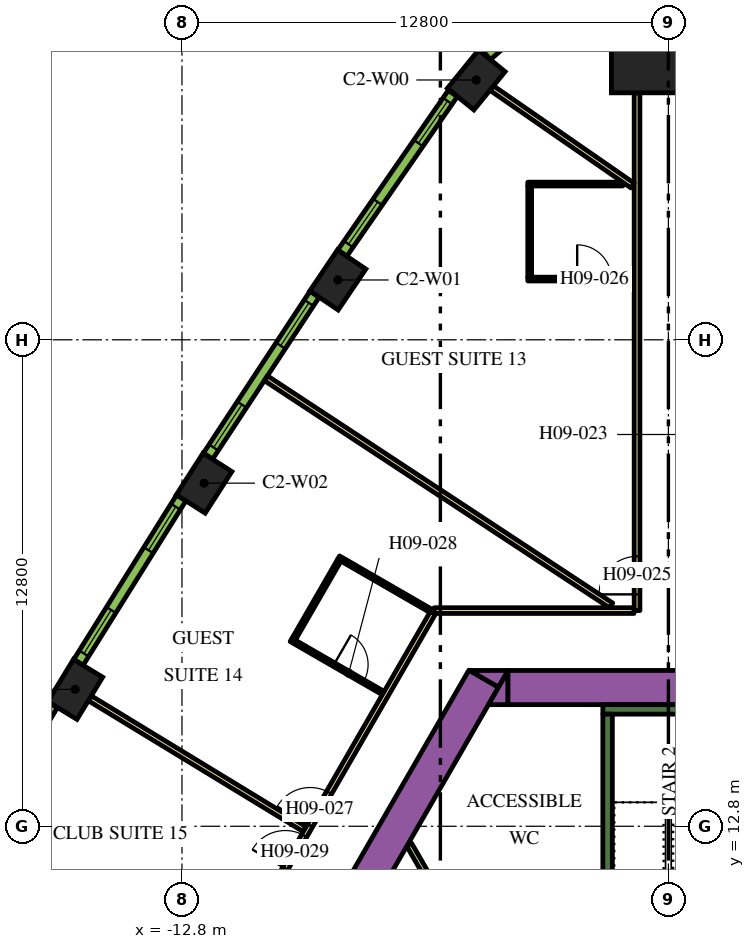
"""IFC4 building model, lengths in metres.
Left out: names, types, materials, properties, quantities, classifications, styles, units other than length and angle.
Written with IfcOpenShell. Run it as: python <this file> out.ifc"""

import sys

from ifc_helpers import new_model, si_unit, direction, frame, frame_2d, origin, origin_2d, place, context, subcontext, project, spatial, polyline, rectangle, outline, extrude, element, fill, save


model = new_model("IFC4")
c1 = context("Model", 3, precision=1e-05, world=origin(), true_north=direction((0.0, 1.0)))
c2 = subcontext(c1, "Body", "Model", "MODEL_VIEW")
j1 = project(units=[si_unit("LENGTHUNIT", "METRE"), si_unit("PLANEANGLEUNIT", "RADIAN")], contexts=[c1])
p1 = place(None, origin())
s1 = spatial("IfcSite", under=j1, at=p1, CompositionType="ELEMENT")
p2 = place(p1, origin())
s2 = spatial("IfcBuilding", under=s1, at=p2, CompositionType="ELEMENT")
p3 = place(p2, frame((0.0, 0.0, 122.7)))
s3 = spatial("IfcBuildingStorey", under=s2, at=p3, CompositionType="ELEMENT", Elevation=122.7)
p4 = place(p3, frame((0.0, 33.598, 0.0), z_axis=(0.0, 0.0, 1.0), x_axis=(0.0, 1.0, 0.0)))
e1 = element("IfcColumn", 1, at=p4, inside=s3, PredefinedType="COLUMN", context=c2, shape_type="SweptSolid", body=[
    extrude(rectangle(XDim=3.0, YDim=3.0, at=origin_2d()), origin(), (0.0, 0.0, 1.0), 3.9),
])
for number, where, z_axis, x_axis in (
    (2, (-5.056, 32.437, 0.0), (0.0, 0.0, 1.0), (-0.632, -0.775, 0.0)),
    (3, (-8.699, 27.174, 0.0), (0.0, 0.0, 1.0), (-0.559, -0.829, 0.0)),
    (4, (-12.217, 21.828, 0.0), (0.0, 0.0, 1.0), (-0.54, -0.842, 0.0)),
    (5, (-15.609, 16.402, 0.0), (0.0, 0.0, 1.0), (-0.52, -0.854, 0.0)),
):
    element("IfcColumn", number, at=place(p3, frame(where, z_axis=z_axis, x_axis=x_axis)), inside=s3, PredefinedType="COLUMN", context=c2, shape_type="SweptSolid", body=[
        extrude(rectangle(XDim=1.3, YDim=0.9, at=origin_2d()), origin(), (0.0, 0.0, 1.0), 3.9),
    ])
p5 = place(p3, frame((-15.36, -1.503, 0.0), z_axis=(0.0, 0.0, 1.0), x_axis=(0.50000389221, 0.866023156604, 0.0)))
e6 = element("IfcWall", 6, at=p5, inside=s3, PredefinedType="SOLIDWALL", context=c2, shape_type="SweptSolid", body=[
    extrude(rectangle(XDim=21.0, YDim=0.9, at=frame_2d((10.5, 0.0))), origin(), (0.0, 0.0, 1.0), 3.9),
])
p6 = place(p3, origin())
e7 = element("IfcWall", 7, at=p6, inside=s3, PredefinedType="SOLIDWALL", context=c2, shape_type="SweptSolid", body=[
    extrude(outline(polyline([(-4.215, 16.9), (-4.469, 16.46), (-5.231, 16.9), (-4.215, 16.9)])), origin(), (0.0, 0.0, 1.0), 3.9),
])
p7 = place(p3, frame((-4.224, 16.45, 0.0), z_axis=(0.0, 0.0, 1.0), x_axis=(1.0, 0.0, 0.0)))
e8 = element("IfcWall", 8, at=p7, inside=s3, PredefinedType="SOLIDWALL", context=c2, shape_type="SweptSolid", body=[
    extrude(rectangle(XDim=9.488, YDim=0.9, at=frame_2d((4.744, 0.0))), origin(), (0.0, 0.0, 1.0), 3.9),
])
e9 = element("IfcWall", 9, at=p6, inside=s3, PredefinedType="SOLIDWALL", context=c2, shape_type="SweptSolid", body=[
    extrude(outline(polyline([(-4.734, 16.0), (-4.226, 16.88), (-4.226, 16.0), (-4.734, 16.0)])), origin(), (0.0, 0.0, 1.0), 3.9),
])
p8 = place(p3, frame((-1.725, 15.875, 0.0), z_axis=(0.0, 0.0, 1.0), x_axis=(1.0, 0.0, 0.0)))
e10 = element("IfcWall", 10, at=p8, inside=s3, PredefinedType="SOLIDWALL", context=c2, shape_type="SweptSolid", body=[
    extrude(rectangle(XDim=3.45, YDim=0.25, at=frame_2d((1.725, 0.0))), origin(), (0.0, 0.0, 1.0), 3.9),
])
p9 = place(p3, frame((-1.6, 8.7, 0.0), z_axis=(0.0, 0.0, 1.0), x_axis=(0.0, 1.0, 0.0)))
e11 = element("IfcWall", 11, at=p9, inside=s3, PredefinedType="SOLIDWALL", context=c2, shape_type="SweptSolid", body=[
    extrude(rectangle(XDim=7.05, YDim=0.25, at=frame_2d((3.525, 0.0))), origin(), (0.0, 0.0, 1.0), 3.9),
])
p10 = place(p3, frame((-6.823, 12.318, 0.0), z_axis=(0.0, 0.0, 1.0), x_axis=(0.500007885066, -0.866020851292, 0.0)))
e12 = element("IfcWall", 12, at=p10, inside=s3, PredefinedType="PARTITIONING", context=c2, shape_type="SweptSolid", body=[
    extrude(rectangle(XDim=4.072, YDim=0.15, at=frame_2d((2.036, 0.0))), origin(), (0.0, 0.0, 1.0), 2.75),
])
p11 = place(p3, frame((-0.825, 18.475, 0.0), z_axis=(0.0, 0.0, 1.0), x_axis=(0.0, 1.0, 0.0)))
e13 = element("IfcWall", 13, at=p11, inside=s3, PredefinedType="PARTITIONING", context=c2, shape_type="SweptSolid", body=[
    extrude(rectangle(XDim=13.623, YDim=0.15, at=frame_2d((6.812, 0.0))), origin(), (0.0, 0.0, 1.0), 2.75),
])
p12 = place(p11, frame((0.427, 0.0, 0.0)))
e14 = element("IfcOpeningElement", 14, at=p12, cuts=e13, PredefinedType="OPENING", context=c2, shape_type="SweptSolid", body=[
    extrude(rectangle(XDim=1.0, YDim=2.1, at=frame_2d((0.5, 1.05))), frame((0.0, 0.085, 0.0), z_axis=(0.0, -1.0, 0.0), x_axis=(1.0, 0.0, 0.0)), (0.0, 0.0, 1.0), 0.17),
])
p13 = place(p3, frame((-6.163, 18.475, 0.0), z_axis=(0.0, 0.0, 1.0), x_axis=(1.0, 0.0, 0.0)))
e15 = element("IfcWall", 15, at=p13, inside=s3, PredefinedType="PARTITIONING", context=c2, shape_type="SweptSolid", body=[
    extrude(rectangle(XDim=5.258, YDim=0.15, at=frame_2d((2.629, 0.0))), origin(), (0.0, 0.0, 1.0), 2.75),
])
p14 = place(p3, frame((-19.081, -3.9, 0.0), z_axis=(0.0, 0.0, 1.0), x_axis=(0.499998313975, 0.866026377209, 0.0)))
e16 = element("IfcWall", 16, at=p14, inside=s3, PredefinedType="PARTITIONING", context=c2, shape_type="SweptSolid", body=[
    extrude(rectangle(XDim=25.766, YDim=0.15, at=frame_2d((12.883, 0.0))), origin(), (0.0, 0.0, 1.0), 2.75),
])
p15 = place(p14, frame((19.306, 0.0, 0.0)))
e17 = element("IfcOpeningElement", 17, at=p15, cuts=e16, PredefinedType="OPENING", context=c2, shape_type="SweptSolid", body=[
    extrude(rectangle(XDim=1.0, YDim=2.1, at=frame_2d((0.5, 1.05))), frame((0.0, 0.085, 0.0), z_axis=(0.0, -1.0, 0.0), x_axis=(1.0, 0.0, 0.0)), (0.0, 0.0, 1.0), 0.17),
])
p16 = place(p14, frame((18.0, 0.0, 0.0)))
e18 = element("IfcOpeningElement", 18, at=p16, cuts=e16, PredefinedType="OPENING", context=c2, shape_type="SweptSolid", body=[
    extrude(rectangle(XDim=1.0, YDim=2.1, at=frame_2d((0.5, 1.05))), frame((0.0, 0.085, 0.0), z_axis=(0.0, -1.0, 0.0), x_axis=(1.0, 0.0, 0.0)), (0.0, 0.0, 1.0), 0.17),
])
p17 = place(p14, frame((7.793, 0.0, 0.0)))
e19 = element("IfcOpeningElement", 19, at=p17, cuts=e16, PredefinedType="OPENING", context=c2, shape_type="SweptSolid", body=[
    extrude(rectangle(XDim=0.9, YDim=2.1, at=frame_2d((0.45, 1.05))), frame((0.0, 0.085, 0.0), z_axis=(0.0, -1.0, 0.0), x_axis=(1.0, 0.0, 0.0)), (0.0, 0.0, 1.0), 0.17),
])
p18 = place(p14, frame((4.674, 0.0, 0.0)))
e20 = element("IfcOpeningElement", 20, at=p18, cuts=e16, PredefinedType="OPENING", context=c2, shape_type="SweptSolid", body=[
    extrude(rectangle(XDim=0.9, YDim=2.1, at=frame_2d((0.45, 1.05))), frame((0.0, 0.085, 0.0), z_axis=(0.0, -1.0, 0.0), x_axis=(1.0, 0.0, 0.0)), (0.0, 0.0, 1.0), 0.17),
])
p19 = place(p14, frame((0.18, 0.0, 0.0)))
e21 = element("IfcOpeningElement", 21, at=p19, cuts=e16, PredefinedType="OPENING", context=c2, shape_type="SweptSolid", body=[
    extrude(rectangle(XDim=1.0, YDim=2.1, at=frame_2d((0.5, 1.05))), frame((0.0, 0.085, 0.0), z_axis=(0.0, -1.0, 0.0), x_axis=(1.0, 0.0, 0.0)), (0.0, 0.0, 1.0), 0.17),
])
p20 = place(p3, frame((-15.225, 16.167, 0.0), z_axis=(0.0, 0.0, 1.0), x_axis=(0.854088713274, -0.520127359266, 0.0)))
e22 = element("IfcWall", 22, at=p20, inside=s3, PredefinedType="PARTITIONING", context=c2, shape_type="SweptSolid", body=[
    extrude(rectangle(XDim=6.611, YDim=0.15, at=frame_2d((3.305, 0.0))), origin(), (0.0, 0.0, 1.0), 2.75),
])
p21 = place(p3, frame((-10.592, 24.589, 0.0), z_axis=(0.0, 0.0, 1.0), x_axis=(0.835337323748, -0.549737715236, 0.0)))
e23 = element("IfcWall", 23, at=p21, inside=s3, PredefinedType="PARTITIONING", context=c2, shape_type="SweptSolid", body=[
    extrude(rectangle(XDim=10.875, YDim=0.15, at=frame_2d((5.438, 0.0))), origin(), (0.0, 0.0, 1.0), 2.75),
])
p22 = place(p3, frame((-4.649, 32.223, 0.0), z_axis=(0.0, 0.0, 1.0), x_axis=(0.822262349475, -0.569108626394, 0.0)))
e24 = element("IfcWall", 24, at=p22, inside=s3, PredefinedType="PARTITIONING", context=c2, shape_type="SweptSolid", body=[
    extrude(rectangle(XDim=4.51, YDim=0.15, at=frame_2d((2.255, 0.0))), origin(), (0.0, 0.0, 1.0), 2.75),
])
p23 = place(p3, frame((-3.7, 27.198, 0.0), z_axis=(0.0, 0.0, 1.0), x_axis=(1.0, 0.0, 0.0)))
e25 = element("IfcWall", 25, at=p23, inside=s3, PredefinedType="PARTITIONING", context=c2, shape_type="SweptSolid", body=[
    extrude(rectangle(XDim=2.8, YDim=0.1, at=frame_2d((1.4, 0.0))), origin(), (0.0, 0.0, 1.0), 2.75),
])
p24 = place(p23, frame((1.3, 0.0, 0.0)))
e26 = element("IfcOpeningElement", 26, at=p24, cuts=e25, PredefinedType="OPENING", context=c2, shape_type="SweptSolid", body=[
    extrude(rectangle(XDim=0.9, YDim=2.1, at=frame_2d((0.45, 1.05))), frame((0.0, 0.06, 0.0), z_axis=(0.0, -1.0, 0.0), x_axis=(1.0, 0.0, 0.0)), (0.0, 0.0, 1.0), 0.12),
])
p25 = place(p3, frame((-3.65, 27.248, 0.0), z_axis=(0.0, 0.0, 1.0), x_axis=(0.0, 1.0, 0.0)))
e27 = element("IfcWall", 27, at=p25, inside=s3, PredefinedType="PARTITIONING", context=c2, shape_type="SweptSolid", body=[
    extrude(rectangle(XDim=2.4, YDim=0.1, at=frame_2d((1.2, 0.0))), origin(), (0.0, 0.0, 1.0), 2.75),
])
p26 = place(p3, frame((-1.2, 29.698, 0.0), z_axis=(0.0, 0.0, 1.0), x_axis=(-1.0, 0.0, 0.0)))
e28 = element("IfcWall", 28, at=p26, inside=s3, PredefinedType="PARTITIONING", context=c2, shape_type="SweptSolid", body=[
    extrude(rectangle(XDim=2.5, YDim=0.1, at=frame_2d((1.25, 0.0))), origin(), (0.0, 0.0, 1.0), 2.75),
])
p27 = place(p3, frame((-9.928, 17.704, 0.0), z_axis=(0.0, 0.0, 1.0), x_axis=(0.866034573852, -0.49998411664, 0.0)))
e29 = element("IfcWall", 29, at=p27, inside=s3, PredefinedType="PARTITIONING", context=c2, shape_type="SweptSolid", body=[
    extrude(rectangle(XDim=2.8, YDim=0.1, at=frame_2d((1.4, 0.0))), origin(), (0.0, 0.0, 1.0), 2.75),
])
p28 = place(p27, frame((1.3, 0.0, 0.0)))
e30 = element("IfcOpeningElement", 30, at=p28, cuts=e29, PredefinedType="OPENING", context=c2, shape_type="SweptSolid", body=[
    extrude(rectangle(XDim=0.9, YDim=2.1, at=frame_2d((0.45, 1.05))), frame((0.0, 0.06, 0.0), z_axis=(0.0, -1.0, 0.0), x_axis=(1.0, 0.0, 0.0)), (0.0, 0.0, 1.0), 0.12),
])
p29 = place(p3, frame((-9.86, 17.722, 0.0), z_axis=(0.0, 0.0, 1.0), x_axis=(0.500001309137, 0.866024647952, 0.0)))
e31 = element("IfcWall", 31, at=p29, inside=s3, PredefinedType="PARTITIONING", context=c2, shape_type="SweptSolid", body=[
    extrude(rectangle(XDim=2.4, YDim=0.1, at=frame_2d((1.2, 0.0))), origin(), (0.0, 0.0, 1.0), 2.75),
])
p30 = place(p3, frame((-6.253, 18.469, 0.0), z_axis=(0.0, 0.0, 1.0), x_axis=(-0.866034573852, 0.49998411664, 0.0)))
e32 = element("IfcWall", 32, at=p30, inside=s3, PredefinedType="PARTITIONING", context=c2, shape_type="SweptSolid", body=[
    extrude(rectangle(XDim=2.8, YDim=0.1, at=frame_2d((1.4, 0.0))), origin(), (0.0, 0.0, 1.0), 2.75),
])
p31 = place(p3, frame((-3.405, 34.275, 0.0), z_axis=(0.0, 0.0, 1.0), x_axis=(-0.754882764627, -0.655859749999, 0.0)))
e33 = element("IfcWall", 33, at=p31, inside=s3, PredefinedType="SOLIDWALL", context=c2, shape_type="SweptSolid", body=[
    extrude(rectangle(XDim=1.82, YDim=0.29, at=frame_2d((0.91, 0.0))), origin(), (0.0, 0.0, 1.0), 3.65),
])
p32 = place(p31, frame((0.46, 0.0, 0.9)))
e34 = element("IfcOpeningElement", 34, at=p32, cuts=e33, PredefinedType="OPENING", context=c2, shape_type="SweptSolid", body=[
    extrude(rectangle(XDim=0.9, YDim=2.15, at=frame_2d((0.45, 1.075))), frame((0.0, 0.155, 0.0), z_axis=(0.0, -1.0, 0.0), x_axis=(1.0, 0.0, 0.0)), (0.0, 0.0, 1.0), 0.31),
])
p33 = place(p3, frame((-5.673, 32.081, 0.0), z_axis=(0.0, 0.0, 1.0), x_axis=(-0.569113019126, -0.822259309136, 0.0)))
e35 = element("IfcWall", 35, at=p33, inside=s3, PredefinedType="SOLIDWALL", context=c2, shape_type="SweptSolid", body=[
    extrude(rectangle(XDim=5.107, YDim=0.29, at=frame_2d((2.553, 0.0))), origin(), (0.0, 0.0, 1.0), 3.65),
])
p34 = place(p33, frame((0.24, 0.0, 0.9)))
e36 = element("IfcOpeningElement", 36, at=p34, cuts=e35, PredefinedType="OPENING", context=c2, shape_type="SweptSolid", body=[
    extrude(rectangle(XDim=1.35, YDim=2.15, at=frame_2d((0.675, 1.075))), frame((0.0, 0.155, 0.0), z_axis=(0.0, -1.0, 0.0), x_axis=(1.0, 0.0, 0.0)), (0.0, 0.0, 1.0), 0.31),
])
p35 = place(p33, frame((3.471, 0.0, 0.9)))
e37 = element("IfcOpeningElement", 37, at=p35, cuts=e35, PredefinedType="OPENING", context=c2, shape_type="SweptSolid", body=[
    extrude(rectangle(XDim=1.35, YDim=2.15, at=frame_2d((0.675, 1.075))), frame((0.0, 0.155, 0.0), z_axis=(0.0, -1.0, 0.0), x_axis=(1.0, 0.0, 0.0)), (0.0, 0.0, 1.0), 0.31),
])
p36 = place(p3, frame((-9.311, 26.799, 0.0), z_axis=(0.0, 0.0, 1.0), x_axis=(-0.549741341923, -0.835334937005, 0.0)))
e38 = element("IfcWall", 38, at=p36, inside=s3, PredefinedType="SOLIDWALL", context=c2, shape_type="SweptSolid", body=[
    extrude(rectangle(XDim=5.1, YDim=0.29, at=frame_2d((2.55, 0.0))), origin(), (0.0, 0.0, 1.0), 3.65),
])
p37 = place(p36, frame((0.273, 0.0, 0.9)))
e39 = element("IfcOpeningElement", 39, at=p37, cuts=e38, PredefinedType="OPENING", context=c2, shape_type="SweptSolid", body=[
    extrude(rectangle(XDim=1.35, YDim=2.15, at=frame_2d((0.675, 1.075))), frame((0.0, 0.155, 0.0), z_axis=(0.0, -1.0, 0.0), x_axis=(1.0, 0.0, 0.0)), (0.0, 0.0, 1.0), 0.31),
])
p38 = place(p36, frame((3.478, 0.0, 0.9)))
e40 = element("IfcOpeningElement", 40, at=p38, cuts=e38, PredefinedType="OPENING", context=c2, shape_type="SweptSolid", body=[
    extrude(rectangle(XDim=1.35, YDim=2.15, at=frame_2d((0.675, 1.075))), frame((0.0, 0.155, 0.0), z_axis=(0.0, -1.0, 0.0), x_axis=(1.0, 0.0, 0.0)), (0.0, 0.0, 1.0), 0.31),
])
p39 = place(p3, frame((-12.82, 21.439, 0.0), z_axis=(0.0, 0.0, 1.0), x_axis=(-0.530072082134, -0.847952585787, 0.0)))
e41 = element("IfcWall", 41, at=p39, inside=s3, PredefinedType="SOLIDWALL", context=c2, shape_type="SweptSolid", body=[
    extrude(rectangle(XDim=5.1, YDim=0.29, at=frame_2d((2.55, 0.0))), origin(), (0.0, 0.0, 1.0), 3.65),
])
p40 = place(p39, frame((0.273, 0.0, 0.9)))
e42 = element("IfcOpeningElement", 42, at=p40, cuts=e41, PredefinedType="OPENING", context=c2, shape_type="SweptSolid", body=[
    extrude(rectangle(XDim=1.35, YDim=2.15, at=frame_2d((0.675, 1.075))), frame((0.0, 0.155, 0.0), z_axis=(0.0, -1.0, 0.0), x_axis=(1.0, 0.0, 0.0)), (0.0, 0.0, 1.0), 0.31),
])
p41 = place(p39, frame((3.478, 0.0, 0.9)))
e43 = element("IfcOpeningElement", 43, at=p41, cuts=e41, PredefinedType="OPENING", context=c2, shape_type="SweptSolid", body=[
    extrude(rectangle(XDim=1.35, YDim=2.15, at=frame_2d((0.675, 1.075))), frame((0.0, 0.155, 0.0), z_axis=(0.0, -1.0, 0.0), x_axis=(1.0, 0.0, 0.0)), (0.0, 0.0, 1.0), 0.31),
])
p42 = place(p3, frame((-16.203, 15.998, 0.0), z_axis=(0.0, 0.0, 1.0), x_axis=(-0.510054281659, -0.860142214847, 0.0)))
e44 = element("IfcWall", 44, at=p42, inside=s3, PredefinedType="SOLIDWALL", context=c2, shape_type="SweptSolid", body=[
    extrude(rectangle(XDim=5.101, YDim=0.29, at=frame_2d((2.55, 0.0))), origin(), (0.0, 0.0, 1.0), 3.65),
])
p43 = place(p42, frame((0.273, 0.0, 0.9)))
e45 = element("IfcOpeningElement", 45, at=p43, cuts=e44, PredefinedType="OPENING", context=c2, shape_type="SweptSolid", body=[
    extrude(rectangle(XDim=1.35, YDim=2.15, at=frame_2d((0.675, 1.075))), frame((0.0, 0.155, 0.0), z_axis=(0.0, -1.0, 0.0), x_axis=(1.0, 0.0, 0.0)), (0.0, 0.0, 1.0), 0.31),
])
p44 = place(p42, frame((3.478, 0.0, 0.9)))
e46 = element("IfcOpeningElement", 46, at=p44, cuts=e44, PredefinedType="OPENING", context=c2, shape_type="SweptSolid", body=[
    extrude(rectangle(XDim=1.35, YDim=2.15, at=frame_2d((0.675, 1.075))), frame((0.0, 0.155, 0.0), z_axis=(0.0, -1.0, 0.0), x_axis=(1.0, 0.0, 0.0)), (0.0, 0.0, 1.0), 0.31),
])
p45 = place(p12, origin())
e47 = element("IfcDoor", 47, at=p45, inside=s3, OperationType="SINGLE_SWING_LEFT", PredefinedType="DOOR", context=c2, shape_type="SweptSolid", body=[
    extrude(rectangle(XDim=1.0, YDim=2.1, at=frame_2d((0.5, 1.05))), frame((0.0, 0.025, 0.0), z_axis=(0.0, -1.0, 0.0), x_axis=(1.0, 0.0, 0.0)), (0.0, 0.0, 1.0), 0.05),
])
fill(e14, e47)
p46 = place(p24, origin())
e48 = element("IfcDoor", 48, at=p46, inside=s3, OperationType="SINGLE_SWING_LEFT", PredefinedType="DOOR", context=c2, shape_type="SweptSolid", body=[
    extrude(rectangle(XDim=0.9, YDim=2.1, at=frame_2d((0.45, 1.05))), frame((0.0, 0.025, 0.0), z_axis=(0.0, -1.0, 0.0), x_axis=(1.0, 0.0, 0.0)), (0.0, 0.0, 1.0), 0.05),
])
fill(e26, e48)
p47 = place(p15, origin())
e49 = element("IfcDoor", 49, at=p47, inside=s3, OperationType="SINGLE_SWING_LEFT", PredefinedType="DOOR", context=c2, shape_type="SweptSolid", body=[
    extrude(rectangle(XDim=1.0, YDim=2.1, at=frame_2d((0.5, 1.05))), frame((0.0, 0.025, 0.0), z_axis=(0.0, -1.0, 0.0), x_axis=(1.0, 0.0, 0.0)), (0.0, 0.0, 1.0), 0.05),
])
fill(e17, e49)
p48 = place(p28, origin())
e50 = element("IfcDoor", 50, at=p48, inside=s3, OperationType="SINGLE_SWING_LEFT", PredefinedType="DOOR", context=c2, shape_type="SweptSolid", body=[
    extrude(rectangle(XDim=0.9, YDim=2.1, at=frame_2d((0.45, 1.05))), frame((0.0, 0.025, 0.0), z_axis=(0.0, -1.0, 0.0), x_axis=(1.0, 0.0, 0.0)), (0.0, 0.0, 1.0), 0.05),
])
fill(e30, e50)
p49 = place(p16, origin())
e51 = element("IfcDoor", 51, at=p49, inside=s3, OperationType="SINGLE_SWING_RIGHT", PredefinedType="DOOR", context=c2, shape_type="SweptSolid", body=[
    extrude(rectangle(XDim=1.0, YDim=2.1, at=frame_2d((0.5, 1.05))), frame((0.0, 0.025, 0.0), z_axis=(0.0, -1.0, 0.0), x_axis=(1.0, 0.0, 0.0)), (0.0, 0.0, 1.0), 0.05),
])
fill(e18, e51)
p50 = place(p34, origin())
e52 = element("IfcWindow", 52, at=p50, inside=s3, PartitioningType="DOUBLE_PANEL_VERTICAL", PredefinedType="WINDOW", context=c2, shape_type="SweptSolid", body=[
    extrude(rectangle(XDim=1.35, YDim=2.15, at=frame_2d((0.675, 1.075))), frame((0.0, 0.015, 0.0), z_axis=(0.0, -1.0, 0.0), x_axis=(1.0, 0.0, 0.0)), (0.0, 0.0, 1.0), 0.06),
])
fill(e36, e52)
p51 = place(p35, origin())
e53 = element("IfcWindow", 53, at=p51, inside=s3, PartitioningType="DOUBLE_PANEL_VERTICAL", PredefinedType="WINDOW", context=c2, shape_type="SweptSolid", body=[
    extrude(rectangle(XDim=1.35, YDim=2.15, at=frame_2d((0.675, 1.075))), frame((0.0, 0.015, 0.0), z_axis=(0.0, -1.0, 0.0), x_axis=(1.0, 0.0, 0.0)), (0.0, 0.0, 1.0), 0.06),
])
fill(e37, e53)
p52 = place(p37, origin())
e54 = element("IfcWindow", 54, at=p52, inside=s3, PartitioningType="DOUBLE_PANEL_VERTICAL", PredefinedType="WINDOW", context=c2, shape_type="SweptSolid", body=[
    extrude(rectangle(XDim=1.35, YDim=2.15, at=frame_2d((0.675, 1.075))), frame((0.0, 0.015, 0.0), z_axis=(0.0, -1.0, 0.0), x_axis=(1.0, 0.0, 0.0)), (0.0, 0.0, 1.0), 0.06),
])
fill(e39, e54)
p53 = place(p38, origin())
e55 = element("IfcWindow", 55, at=p53, inside=s3, PartitioningType="DOUBLE_PANEL_VERTICAL", PredefinedType="WINDOW", context=c2, shape_type="SweptSolid", body=[
    extrude(rectangle(XDim=1.35, YDim=2.15, at=frame_2d((0.675, 1.075))), frame((0.0, 0.015, 0.0), z_axis=(0.0, -1.0, 0.0), x_axis=(1.0, 0.0, 0.0)), (0.0, 0.0, 1.0), 0.06),
])
fill(e40, e55)
p54 = place(p40, origin())
e56 = element("IfcWindow", 56, at=p54, inside=s3, PartitioningType="DOUBLE_PANEL_VERTICAL", PredefinedType="WINDOW", context=c2, shape_type="SweptSolid", body=[
    extrude(rectangle(XDim=1.35, YDim=2.15, at=frame_2d((0.675, 1.075))), frame((0.0, 0.015, 0.0), z_axis=(0.0, -1.0, 0.0), x_axis=(1.0, 0.0, 0.0)), (0.0, 0.0, 1.0), 0.06),
])
fill(e42, e56)
p55 = place(p41, origin())
e57 = element("IfcWindow", 57, at=p55, inside=s3, PartitioningType="DOUBLE_PANEL_VERTICAL", PredefinedType="WINDOW", context=c2, shape_type="SweptSolid", body=[
    extrude(rectangle(XDim=1.35, YDim=2.15, at=frame_2d((0.675, 1.075))), frame((0.0, 0.015, 0.0), z_axis=(0.0, -1.0, 0.0), x_axis=(1.0, 0.0, 0.0)), (0.0, 0.0, 1.0), 0.06),
])
fill(e43, e57)
save(model, sys.argv[1])
